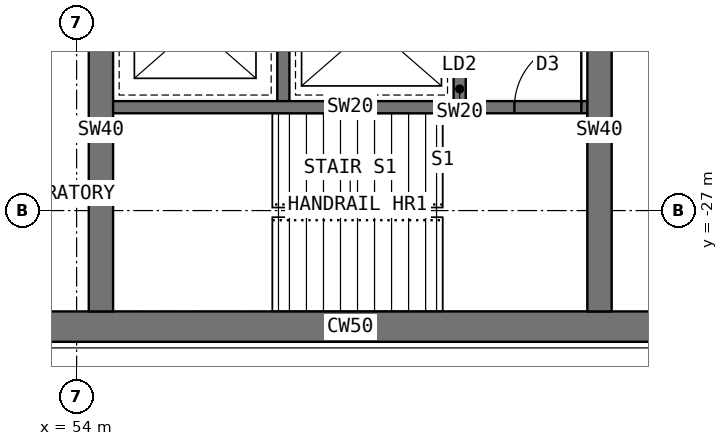
"""IFC4 building model, lengths in metres.
Left out: names, types, materials, properties, quantities, classifications, styles, units other than length and angle.
Written with IfcOpenShell. Run it as: python <this file> out.ifc"""

import sys

from ifc_helpers import new_model, si_unit, direction, frame, frame_2d, origin, place, context, subcontext, project, spatial, rectangle, extrude, element, fill, save


model = new_model("IFC4")
c1 = context("Model", 3, precision=1e-05, world=origin(), true_north=direction((0.0, 1.0)))
c2 = subcontext(c1, "Body", "Model", "MODEL_VIEW")
j1 = project(units=[si_unit("LENGTHUNIT", "METRE"), si_unit("PLANEANGLEUNIT", "RADIAN")], contexts=[c1])
p1 = place(None, origin())
s1 = spatial("IfcSite", under=j1, at=p1, CompositionType="ELEMENT")
p2 = place(p1, origin())
s2 = spatial("IfcBuilding", under=s1, at=p2, CompositionType="ELEMENT")
p3 = place(p2, frame((0.0, 0.0, 174.5)))
s3 = spatial("IfcBuildingStorey", under=s2, at=p3, CompositionType="ELEMENT", Elevation=174.5)
p4 = place(p3, frame((52.202, -28.908, 0.0), z_axis=(0.0, 0.0, 1.0), x_axis=(1.0, 0.0, 0.0)))
e1 = element("IfcWall", 1, at=p4, inside=s3, PredefinedType="SHEAR", context=c2, shape_type="SweptSolid", body=[
    extrude(rectangle(XDim=12.596, YDim=0.5, at=frame_2d((6.298, 0.0))), origin(), (0.0, 0.0, 1.0), 4.0),
])
p5 = place(p3, frame((57.4, -22.7, 0.0), z_axis=(0.0, 0.0, 1.0), x_axis=(0.0, -1.0, 0.0)))
e2 = element("IfcWall", 2, at=p5, inside=s3, PredefinedType="SHEAR", context=c2, shape_type="SweptSolid", body=[
    extrude(rectangle(XDim=2.6, YDim=0.2, at=frame_2d((1.3, 0.0))), origin(), (0.0, 0.0, 1.0), 4.0),
])
p6 = place(p3, frame((60.3, -22.7, 0.0), z_axis=(0.0, 0.0, 1.0), x_axis=(0.0, -1.0, 0.0)))
e3 = element("IfcWall", 3, at=p6, inside=s3, PredefinedType="SHEAR", context=c2, shape_type="SweptSolid", body=[
    extrude(rectangle(XDim=2.6, YDim=0.2, at=frame_2d((1.3, 0.0))), origin(), (0.0, 0.0, 1.0), 4.0),
])
p7 = place(p6, frame((0.55, 0.0, 0.0)))
e4 = element("IfcOpeningElement", 4, at=p7, cuts=e3, PredefinedType="OPENING", context=c2, shape_type="SweptSolid", body=[
    extrude(rectangle(XDim=1.3, YDim=2.2, at=frame_2d((0.65, 1.1))), frame((0.0, 0.11, 0.0), z_axis=(0.0, -1.0, 0.0), x_axis=(1.0, 0.0, 0.0)), (0.0, 0.0, 1.0), 0.22),
])
p8 = place(p3, frame((54.5, -25.3, 0.0), z_axis=(0.0, 0.0, 1.0), x_axis=(1.0, 0.0, 0.0)))
e5 = element("IfcWall", 5, at=p8, inside=s3, PredefinedType="SHEAR", context=c2, shape_type="SweptSolid", body=[
    extrude(rectangle(XDim=8.0, YDim=0.2, at=frame_2d((4.0, 0.0))), origin(), (0.0, 0.0, 1.0), 4.0),
])
p9 = place(p8, frame((6.7, 0.0, 0.0)))
e6 = element("IfcOpeningElement", 6, at=p9, cuts=e5, PredefinedType="OPENING", context=c2, shape_type="SweptSolid", body=[
    extrude(rectangle(XDim=1.1, YDim=2.1, at=frame_2d((0.55, 1.05))), frame((0.0, 0.11, 0.0), z_axis=(0.0, -1.0, 0.0), x_axis=(1.0, 0.0, 0.0)), (0.0, 0.0, 1.0), 0.22),
])
for number, where, z_axis, x_axis in (
    (7, (62.6, -22.7, 0.0), (0.0, 0.0, 1.0), (0.0, -1.0, 0.0)),
    (8, (54.4, -22.7, 0.0), (0.0, 0.0, 1.0), (0.0, -1.0, 0.0)),
):
    element("IfcWall", number, at=place(p3, frame(where, z_axis=z_axis, x_axis=x_axis)), inside=s3, PredefinedType="SHEAR", context=c2, shape_type="SweptSolid", body=[
        extrude(rectangle(XDim=5.958, YDim=0.4, at=frame_2d((2.979, 0.0))), origin(), (0.0, 0.0, 1.0), 4.0),
    ])
p10 = place(p3, frame((54.017, -22.436, 0.0), z_axis=(0.0, 0.0, 1.0), x_axis=(-0.866024503882, -0.500001558674, 0.0)))
e9 = element("IfcWall", 9, at=p10, inside=s3, PredefinedType="PARTITIONING", context=c2, shape_type="SweptSolid", body=[
    extrude(rectangle(XDim=4.568, YDim=0.15, at=frame_2d((2.284, 0.0))), origin(), (0.0, 0.0, 1.0), 3.8),
])
p11 = place(p10, frame((1.794, 0.0, 0.0)))
e10 = element("IfcOpeningElement", 10, at=p11, cuts=e9, PredefinedType="OPENING", context=c2, shape_type="SweptSolid", body=[
    extrude(rectangle(XDim=1.0, YDim=2.1, at=frame_2d((0.5, 1.05))), frame((0.0, 0.085, 0.0), z_axis=(0.0, -1.0, 0.0), x_axis=(1.0, 0.0, 0.0)), (0.0, 0.0, 1.0), 0.17),
])
p12 = place(p7, origin())
e11 = element("IfcDoor", 11, at=p12, inside=s3, OperationType="DOUBLE_DOOR_SLIDING", PredefinedType="DOOR", context=c2, shape_type="SweptSolid", body=[
    extrude(rectangle(XDim=1.3, YDim=2.2, at=frame_2d((0.65, 1.1))), frame((0.0, 0.025, 0.0), z_axis=(0.0, -1.0, 0.0), x_axis=(1.0, 0.0, 0.0)), (0.0, 0.0, 1.0), 0.05),
])
fill(e4, e11)
p13 = place(p9, origin())
e12 = element("IfcDoor", 12, at=p13, inside=s3, OperationType="SINGLE_SWING_RIGHT", PredefinedType="DOOR", context=c2, shape_type="SweptSolid", body=[
    extrude(rectangle(XDim=1.1, YDim=2.1, at=frame_2d((0.55, 1.05))), frame((0.0, 0.025, 0.0), z_axis=(0.0, -1.0, 0.0), x_axis=(1.0, 0.0, 0.0)), (0.0, 0.0, 1.0), 0.05),
])
fill(e6, e12)
save(model, sys.argv[1])
